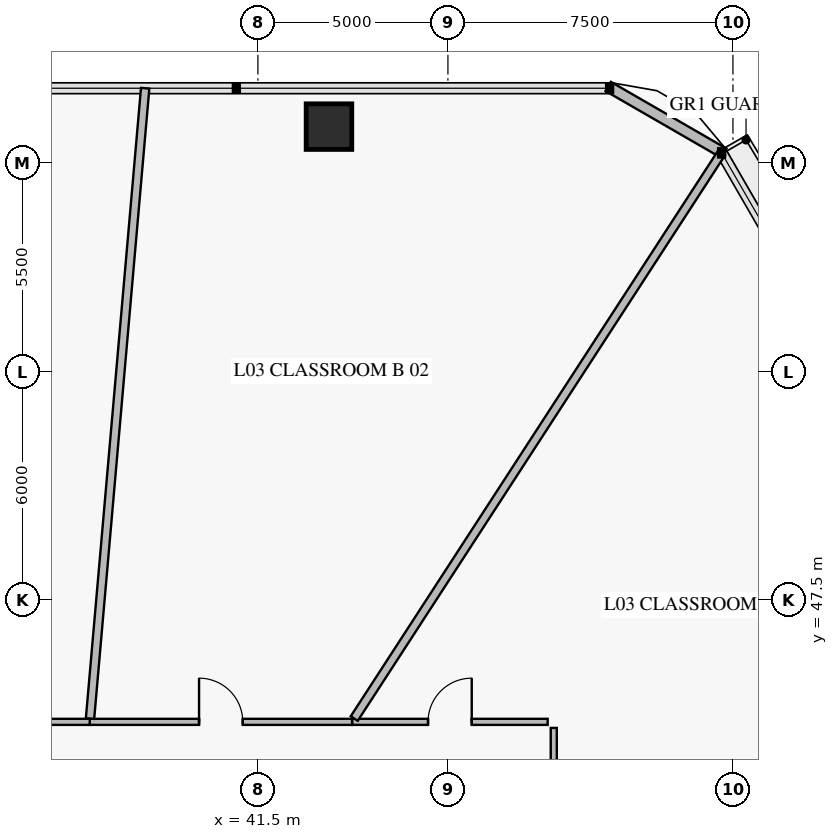
"""IFC4 building model, lengths in metres.
Left out: names, types, materials, properties, quantities, classifications, styles, units other than length and angle.
Written with IfcOpenShell. Run it as: python <this file> out.ifc"""

import sys

from ifc_helpers import new_model, si_unit, direction, frame, frame_2d, origin, origin_2d, place, context, subcontext, project, spatial, rectangle, extrude, element, fill, save


model = new_model("IFC4")
c1 = context("Model", 3, precision=1e-05, world=origin(), true_north=direction((0.0, 1.0)))
c2 = subcontext(c1, "Body", "Model", "MODEL_VIEW")
j1 = project(units=[si_unit("LENGTHUNIT", "METRE"), si_unit("PLANEANGLEUNIT", "RADIAN")], contexts=[c1])
p1 = place(None, origin())
s1 = spatial("IfcSite", under=j1, at=p1, CompositionType="ELEMENT")
p2 = place(p1, origin())
s2 = spatial("IfcBuilding", under=s1, at=p2, CompositionType="ELEMENT")
p3 = place(p2, frame((0.0, 0.0, 12.0)))
s3 = spatial("IfcBuildingStorey", under=s2, at=p3, CompositionType="ELEMENT", Elevation=12.0)
p4 = place(p3, frame((43.37, 59.948, 0.0), z_axis=(0.0, 0.0, 1.0), x_axis=(-1.0, 0.0, 0.0)))
e1 = element("IfcColumn", 1, at=p4, inside=s3, PredefinedType="COLUMN", context=c2, shape_type="SweptSolid", body=[
    extrude(rectangle(XDim=1.2, YDim=1.2, at=origin_2d()), origin(), (0.0, 0.0, 1.0), 3.92),
])
p5 = place(p3, frame((50.717, 61.006, 0.0), z_axis=(0.0, 0.0, 1.0), x_axis=(0.866007452331, -0.500031091541, 0.0)))
e2 = element("IfcWall", 2, at=p5, inside=s3, PredefinedType="SOLIDWALL", context=c2, shape_type="SweptSolid", body=[
    extrude(rectangle(XDim=3.515, YDim=0.28, at=frame_2d((1.757, 0.0))), origin(), (0.0, 0.0, 1.0), 3.92),
])
p6 = place(p3, frame((49.125, 44.285, 0.0), z_axis=(0.0, 0.0, 1.0), x_axis=(-1.0, 0.0, 0.0)))
e3 = element("IfcWall", 3, at=p6, inside=s3, PredefinedType="PARTITIONING", context=c2, shape_type="SweptSolid", body=[
    extrude(rectangle(XDim=5.147, YDim=0.16, at=frame_2d((2.573, 0.0))), origin(), (0.0, 0.0, 1.0), 3.22),
])
p7 = place(p6, frame((1.999, 0.0, 0.0)))
e4 = element("IfcOpeningElement", 4, at=p7, cuts=e3, PredefinedType="OPENING", context=c2, shape_type="SweptSolid", body=[
    extrude(rectangle(XDim=1.15, YDim=2.2, at=frame_2d((0.575, 1.1))), frame((0.0, 0.092, 0.0), z_axis=(0.0, -1.0, 0.0), x_axis=(1.0, 0.0, 0.0)), (0.0, 0.0, 1.0), 0.184),
])
p8 = place(p3, frame((43.978, 44.285, 0.0), z_axis=(0.0, 0.0, 1.0), x_axis=(-1.0, 0.0, 0.0)))
e5 = element("IfcWall", 5, at=p8, inside=s3, PredefinedType="PARTITIONING", context=c2, shape_type="SweptSolid", body=[
    extrude(rectangle(XDim=6.903, YDim=0.16, at=frame_2d((3.452, 0.0))), origin(), (0.0, 0.0, 1.0), 3.22),
])
p9 = place(p8, frame((2.877, 0.0, 0.0)))
e6 = element("IfcOpeningElement", 6, at=p9, cuts=e5, PredefinedType="OPENING", context=c2, shape_type="SweptSolid", body=[
    extrude(rectangle(XDim=1.15, YDim=2.2, at=frame_2d((0.575, 1.1))), frame((0.0, 0.092, 0.0), z_axis=(0.0, -1.0, 0.0), x_axis=(1.0, 0.0, 0.0)), (0.0, 0.0, 1.0), 0.184),
])
p10 = place(p3, frame((37.075, 44.285, 0.0), z_axis=(0.0, 0.0, 1.0), x_axis=(-1.0, 0.0, 0.0)))
e7 = element("IfcWall", 7, at=p10, inside=s3, PredefinedType="PARTITIONING", context=c2, shape_type="SweptSolid", body=[
    extrude(rectangle(XDim=11.754, YDim=0.16, at=frame_2d((5.877, 0.0))), origin(), (0.0, 0.0, 1.0), 3.22),
])
p11 = place(p10, frame((5.302, 0.0, 0.0)))
e8 = element("IfcOpeningElement", 8, at=p11, cuts=e7, PredefinedType="OPENING", context=c2, shape_type="SweptSolid", body=[
    extrude(rectangle(XDim=1.15, YDim=2.2, at=frame_2d((0.575, 1.1))), frame((0.0, 0.092, 0.0), z_axis=(0.0, -1.0, 0.0), x_axis=(1.0, 0.0, 0.0)), (0.0, 0.0, 1.0), 0.184),
])
p12 = place(p3, frame((53.493, 41.697, 0.0), z_axis=(0.0, 0.0, 1.0), x_axis=(0.874622025543, 0.484805437711, 0.0)))
e9 = element("IfcWall", 9, at=p12, inside=s3, PredefinedType="PARTITIONING", context=c2, shape_type="SweptSolid", body=[
    extrude(rectangle(XDim=8.962, YDim=0.22, at=frame_2d((4.481, 0.0))), origin(), (0.0, 0.0, 1.0), 3.17),
])
p13 = place(p3, frame((44.035, 44.373, 0.0), z_axis=(0.0, 0.0, 1.0), x_axis=(0.544634848015, 0.838673287, 0.0)))
e10 = element("IfcWall", 10, at=p13, inside=s3, PredefinedType="PARTITIONING", context=c2, shape_type="SweptSolid", body=[
    extrude(rectangle(XDim=17.748, YDim=0.22, at=frame_2d((8.874, 0.0))), origin(), (0.0, 0.0, 1.0), 3.17),
])
p14 = place(p3, frame((49.285, 39.499, 0.0), z_axis=(0.0, 0.0, 1.0), x_axis=(0.0, 1.0, 0.0)))
e11 = element("IfcWall", 11, at=p14, inside=s3, PredefinedType="PARTITIONING", context=c2, shape_type="SweptSolid", body=[
    extrude(rectangle(XDim=4.626, YDim=0.16, at=frame_2d((2.313, 0.0))), origin(), (0.0, 0.0, 1.0), 3.92),
])
p15 = place(p3, frame((37.083, 44.373, 0.0), z_axis=(0.0, 0.0, 1.0), x_axis=(0.087149123156, 0.996195277209, 0.0)))
e12 = element("IfcWall", 12, at=p15, inside=s3, PredefinedType="PARTITIONING", context=c2, shape_type="SweptSolid", body=[
    extrude(rectangle(XDim=16.649, YDim=0.22, at=frame_2d((8.324, 0.0))), origin(), (0.0, 0.0, 1.0), 3.17),
])
p16 = place(p7, frame((1.15, 0.0, 0.0), z_axis=(0.0, 0.0, 1.0), x_axis=(-1.0, 0.0, 0.0)))
e13 = element("IfcDoor", 13, at=p16, inside=s3, OperationType="SINGLE_SWING_RIGHT", PredefinedType="DOOR", context=c2, shape_type="SweptSolid", body=[
    extrude(rectangle(XDim=1.15, YDim=2.2, at=frame_2d((0.575, 1.1))), frame((0.0, 0.025, 0.0), z_axis=(0.0, -1.0, 0.0), x_axis=(1.0, 0.0, 0.0)), (0.0, 0.0, 1.0), 0.05),
])
fill(e4, e13)
p17 = place(p9, frame((1.15, 0.0, 0.0), z_axis=(0.0, 0.0, 1.0), x_axis=(-1.0, 0.0, 0.0)))
e14 = element("IfcDoor", 14, at=p17, inside=s3, OperationType="SINGLE_SWING_LEFT", PredefinedType="DOOR", context=c2, shape_type="SweptSolid", body=[
    extrude(rectangle(XDim=1.15, YDim=2.2, at=frame_2d((0.575, 1.1))), frame((0.0, 0.025, 0.0), z_axis=(0.0, -1.0, 0.0), x_axis=(1.0, 0.0, 0.0)), (0.0, 0.0, 1.0), 0.05),
])
fill(e6, e14)
save(model, sys.argv[1])
